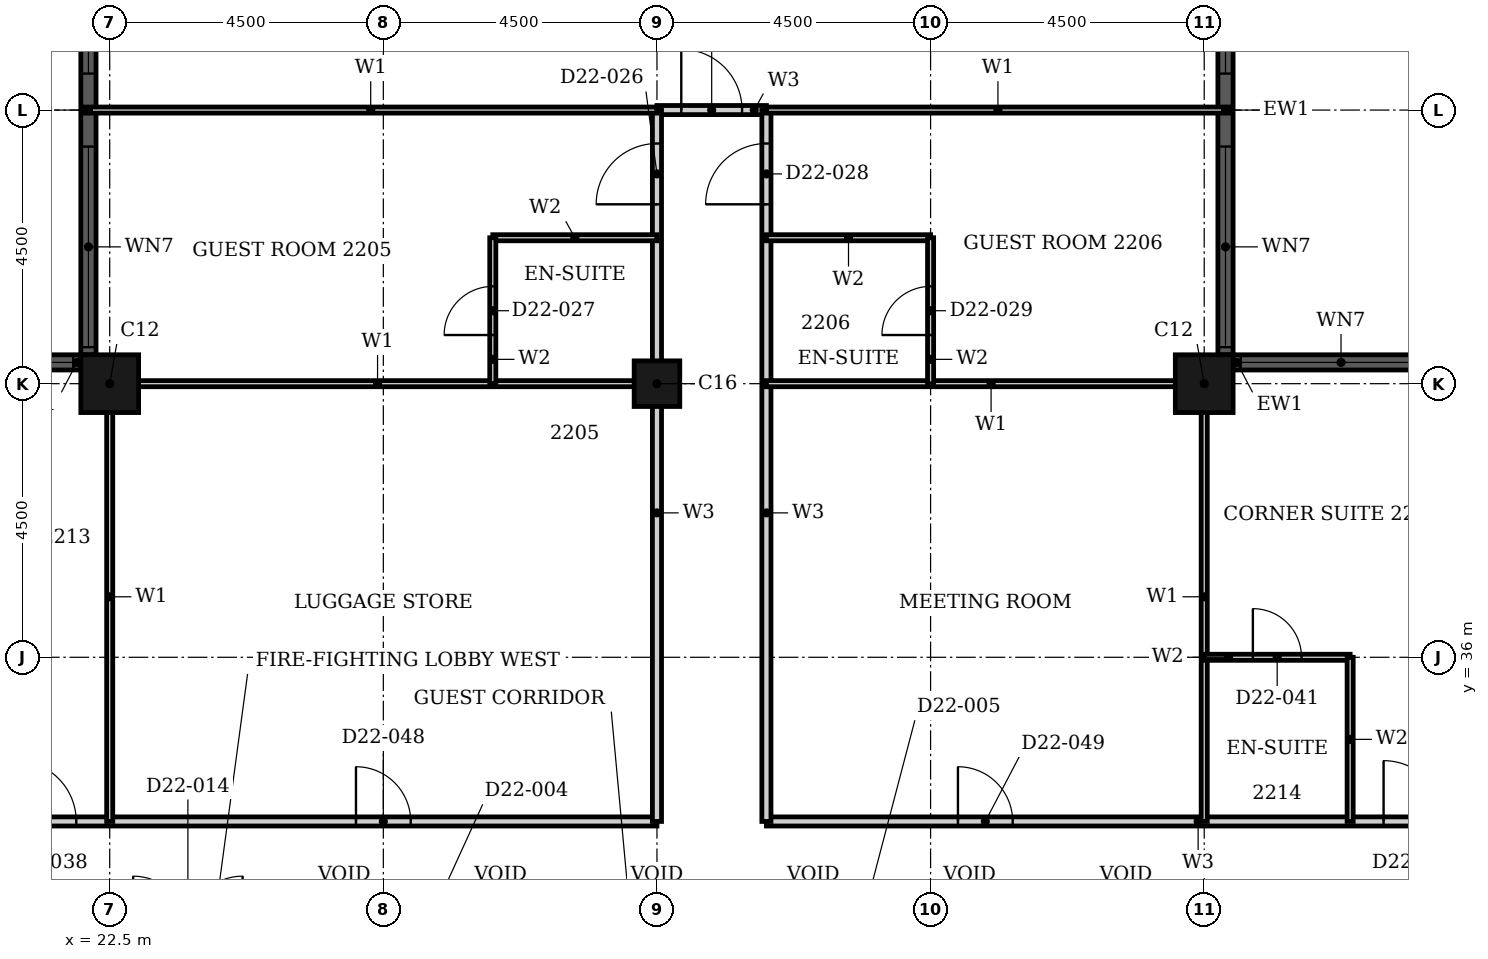
"""IFC4 building model, lengths in metres.
Left out: names, types, materials, properties, quantities, classifications, styles, units other than length and angle.
Written with IfcOpenShell. Run it as: python <this file> out.ifc"""

import sys

from ifc_helpers import new_model, si_unit, direction, frame, frame_2d, origin, origin_2d, place, context, subcontext, project, spatial, rectangle, hollow_rectangle, extrude, element, fill, save


model = new_model("IFC4")
c1 = context("Model", 3, precision=1e-05, world=origin(), true_north=direction((0.0, 1.0)))
c2 = subcontext(c1, "Body", "Model", "MODEL_VIEW")
j1 = project(units=[si_unit("LENGTHUNIT", "METRE"), si_unit("PLANEANGLEUNIT", "RADIAN")], contexts=[c1])
p1 = place(None, origin())
s1 = spatial("IfcSite", under=j1, at=p1, CompositionType="ELEMENT")
p2 = place(p1, origin())
s2 = spatial("IfcBuilding", under=s1, at=p2, CompositionType="ELEMENT")
p3 = place(p2, frame((0.0, 0.0, 92.4)))
s3 = spatial("IfcBuildingStorey", under=s2, at=p3, CompositionType="ELEMENT", Elevation=92.4)
for number, where, z_axis, x_axis in (
    (1, (40.5, 40.5, 0.0), (0.0, 0.0, 1.0), (1.0, 0.0, 0.0)),
    (2, (22.5, 40.5, 0.0), (0.0, 0.0, 1.0), (1.0, 0.0, 0.0)),
):
    element("IfcColumn", number, at=place(p3, frame(where, z_axis=z_axis, x_axis=x_axis)), inside=s3, PredefinedType="COLUMN", context=c2, shape_type="SweptSolid", body=[
        extrude(hollow_rectangle(XDim=0.95, YDim=0.95, WallThickness=0.03, at=origin_2d()), origin(), (0.0, 0.0, 1.0), 3.6),
    ])
p4 = place(p3, frame((31.5, 40.5, 0.0), z_axis=(0.0, 0.0, 1.0), x_axis=(1.0, 0.0, 0.0)))
e3 = element("IfcColumn", 3, at=p4, inside=s3, PredefinedType="COLUMN", context=c2, shape_type="SweptSolid", body=[
    extrude(hollow_rectangle(XDim=0.75, YDim=0.75, WallThickness=0.024, at=origin_2d()), origin(), (0.0, 0.0, 1.0), 3.6),
])
p5 = place(p3, frame((44.525, 40.85, 0.0), z_axis=(0.0, 0.0, 1.0), x_axis=(-1.0, 0.0, 0.0)))
e4 = element("IfcWall", 4, at=p5, inside=s3, PredefinedType="SOLIDWALL", context=c2, shape_type="SweptSolid", body=[
    extrude(rectangle(XDim=3.55, YDim=0.25, at=frame_2d((1.775, 0.0))), origin(), (0.0, 0.0, 1.0), 3.6),
])
p6 = place(p5, frame((0.125, 0.0, 0.9)))
e5 = element("IfcOpeningElement", 5, at=p6, cuts=e4, PredefinedType="OPENING", context=c2, shape_type="SweptSolid", body=[
    extrude(rectangle(XDim=3.3, YDim=1.85, at=frame_2d((1.65, 0.925))), frame((0.0, 0.135, 0.0), z_axis=(0.0, -1.0, 0.0), x_axis=(1.0, 0.0, 0.0)), (0.0, 0.0, 1.0), 0.27),
])
p7 = place(p3, frame((40.85, 40.975, 0.0), z_axis=(0.0, 0.0, 1.0), x_axis=(0.0, 1.0, 0.0)))
e6 = element("IfcWall", 6, at=p7, inside=s3, PredefinedType="SOLIDWALL", context=c2, shape_type="SweptSolid", body=[
    extrude(rectangle(XDim=8.05, YDim=0.25, at=frame_2d((4.025, 0.0))), origin(), (0.0, 0.0, 1.0), 3.6),
])
p8 = place(p7, frame((0.125, 0.0, 0.9)))
e7 = element("IfcOpeningElement", 7, at=p8, cuts=e6, PredefinedType="OPENING", context=c2, shape_type="SweptSolid", body=[
    extrude(rectangle(XDim=3.3, YDim=1.85, at=frame_2d((1.65, 0.925))), frame((0.0, 0.135, 0.0), z_axis=(0.0, -1.0, 0.0), x_axis=(1.0, 0.0, 0.0)), (0.0, 0.0, 1.0), 0.27),
])
p9 = place(p7, frame((4.625, 0.0, 0.9)))
e8 = element("IfcOpeningElement", 8, at=p9, cuts=e6, PredefinedType="OPENING", context=c2, shape_type="SweptSolid", body=[
    extrude(rectangle(XDim=3.3, YDim=1.85, at=frame_2d((1.65, 0.925))), frame((0.0, 0.135, 0.0), z_axis=(0.0, -1.0, 0.0), x_axis=(1.0, 0.0, 0.0)), (0.0, 0.0, 1.0), 0.27),
])
p10 = place(p3, frame((22.15, 49.025, 0.0), z_axis=(0.0, 0.0, 1.0), x_axis=(0.0, -1.0, 0.0)))
e9 = element("IfcWall", 9, at=p10, inside=s3, PredefinedType="SOLIDWALL", context=c2, shape_type="SweptSolid", body=[
    extrude(rectangle(XDim=8.05, YDim=0.25, at=frame_2d((4.025, 0.0))), origin(), (0.0, 0.0, 1.0), 3.6),
])
p11 = place(p10, frame((0.125, 0.0, 0.9)))
e10 = element("IfcOpeningElement", 10, at=p11, cuts=e9, PredefinedType="OPENING", context=c2, shape_type="SweptSolid", body=[
    extrude(rectangle(XDim=3.3, YDim=1.85, at=frame_2d((1.65, 0.925))), frame((0.0, 0.135, 0.0), z_axis=(0.0, -1.0, 0.0), x_axis=(1.0, 0.0, 0.0)), (0.0, 0.0, 1.0), 0.27),
])
p12 = place(p10, frame((4.625, 0.0, 0.9)))
e11 = element("IfcOpeningElement", 11, at=p12, cuts=e9, PredefinedType="OPENING", context=c2, shape_type="SweptSolid", body=[
    extrude(rectangle(XDim=3.3, YDim=1.85, at=frame_2d((1.65, 0.925))), frame((0.0, 0.135, 0.0), z_axis=(0.0, -1.0, 0.0), x_axis=(1.0, 0.0, 0.0)), (0.0, 0.0, 1.0), 0.27),
])
p13 = place(p3, frame((22.025, 40.85, 0.0), z_axis=(0.0, 0.0, 1.0), x_axis=(-1.0, 0.0, 0.0)))
e12 = element("IfcWall", 12, at=p13, inside=s3, PredefinedType="SOLIDWALL", context=c2, shape_type="SweptSolid", body=[
    extrude(rectangle(XDim=3.55, YDim=0.25, at=frame_2d((1.775, 0.0))), origin(), (0.0, 0.0, 1.0), 3.6),
])
p14 = place(p13, frame((0.125, 0.0, 0.9)))
e13 = element("IfcOpeningElement", 13, at=p14, cuts=e12, PredefinedType="OPENING", context=c2, shape_type="SweptSolid", body=[
    extrude(rectangle(XDim=3.3, YDim=1.85, at=frame_2d((1.65, 0.925))), frame((0.0, 0.135, 0.0), z_axis=(0.0, -1.0, 0.0), x_axis=(1.0, 0.0, 0.0)), (0.0, 0.0, 1.0), 0.27),
])
p15 = place(p3, frame((16.2, 33.3, 0.0), z_axis=(0.0, 0.0, 1.0), x_axis=(1.0, 0.0, 0.0)))
e14 = element("IfcWall", 14, at=p15, inside=s3, PredefinedType="PARTITIONING", context=c2, shape_type="SweptSolid", body=[
    extrude(rectangle(XDim=15.3, YDim=0.15, at=frame_2d((7.65, 0.0))), origin(), (0.0, 0.0, 1.0), 3.2),
])
p16 = place(p15, frame((4.75, 0.0, 0.0)))
e15 = element("IfcOpeningElement", 15, at=p16, cuts=e14, PredefinedType="OPENING", context=c2, shape_type="SweptSolid", body=[
    extrude(rectangle(XDim=1.0, YDim=2.1, at=frame_2d((0.5, 1.05))), frame((0.0, 0.085, 0.0), z_axis=(0.0, -1.0, 0.0), x_axis=(1.0, 0.0, 0.0)), (0.0, 0.0, 1.0), 0.17),
])
p17 = place(p15, frame((10.35, 0.0, 0.0)))
e16 = element("IfcOpeningElement", 16, at=p17, cuts=e14, PredefinedType="OPENING", context=c2, shape_type="SweptSolid", body=[
    extrude(rectangle(XDim=0.9, YDim=2.1, at=frame_2d((0.45, 1.05))), frame((0.0, 0.085, 0.0), z_axis=(0.0, -1.0, 0.0), x_axis=(1.0, 0.0, 0.0)), (0.0, 0.0, 1.0), 0.17),
])
p18 = place(p3, frame((33.3, 33.3, 0.0), z_axis=(0.0, 0.0, 1.0), x_axis=(1.0, 0.0, 0.0)))
e17 = element("IfcWall", 17, at=p18, inside=s3, PredefinedType="PARTITIONING", context=c2, shape_type="SweptSolid", body=[
    extrude(rectangle(XDim=13.5, YDim=0.15, at=frame_2d((6.75, 0.0))), origin(), (0.0, 0.0, 1.0), 3.2),
])
p19 = place(p18, frame((10.15, 0.0, 0.0)))
e18 = element("IfcOpeningElement", 18, at=p19, cuts=e17, PredefinedType="OPENING", context=c2, shape_type="SweptSolid", body=[
    extrude(rectangle(XDim=1.0, YDim=2.1, at=frame_2d((0.5, 1.05))), frame((0.0, 0.085, 0.0), z_axis=(0.0, -1.0, 0.0), x_axis=(1.0, 0.0, 0.0)), (0.0, 0.0, 1.0), 0.17),
])
p20 = place(p18, frame((3.15, 0.0, 0.0)))
e19 = element("IfcOpeningElement", 19, at=p20, cuts=e17, PredefinedType="OPENING", context=c2, shape_type="SweptSolid", body=[
    extrude(rectangle(XDim=0.9, YDim=2.1, at=frame_2d((0.45, 1.05))), frame((0.0, 0.085, 0.0), z_axis=(0.0, -1.0, 0.0), x_axis=(1.0, 0.0, 0.0)), (0.0, 0.0, 1.0), 0.17),
])
p21 = place(p3, frame((31.5, 45.0, 0.0), z_axis=(0.0, 0.0, 1.0), x_axis=(1.0, 0.0, 0.0)))
e20 = element("IfcWall", 20, at=p21, inside=s3, PredefinedType="PARTITIONING", context=c2, shape_type="SweptSolid", body=[
    extrude(rectangle(XDim=1.8, YDim=0.15, at=frame_2d((0.9, 0.0))), origin(), (0.0, 0.0, 1.0), 3.2),
])
p22 = place(p21, frame((0.4, 0.0, 0.0)))
e21 = element("IfcOpeningElement", 21, at=p22, cuts=e20, PredefinedType="OPENING", context=c2, shape_type="SweptSolid", body=[
    extrude(rectangle(XDim=1.0, YDim=2.1, at=frame_2d((0.5, 1.05))), frame((0.0, 0.085, 0.0), z_axis=(0.0, -1.0, 0.0), x_axis=(1.0, 0.0, 0.0)), (0.0, 0.0, 1.0), 0.17),
])
p23 = place(p3, frame((31.5, 33.3, 0.0), z_axis=(0.0, 0.0, 1.0), x_axis=(0.0, 1.0, 0.0)))
e22 = element("IfcWall", 22, at=p23, inside=s3, PredefinedType="PARTITIONING", context=c2, shape_type="SweptSolid", body=[
    extrude(rectangle(XDim=11.7, YDim=0.15, at=frame_2d((5.85, 0.0))), origin(), (0.0, 0.0, 1.0), 2.48),
])
p24 = place(p23, frame((10.15, 0.0, 0.0)))
e23 = element("IfcOpeningElement", 23, at=p24, cuts=e22, PredefinedType="OPENING", context=c2, shape_type="SweptSolid", body=[
    extrude(rectangle(XDim=1.0, YDim=2.1, at=frame_2d((0.5, 1.05))), frame((0.0, 0.085, 0.0), z_axis=(0.0, -1.0, 0.0), x_axis=(1.0, 0.0, 0.0)), (0.0, 0.0, 1.0), 0.17),
])
p25 = place(p3, frame((33.3, 33.3, 0.0), z_axis=(0.0, 0.0, 1.0), x_axis=(0.0, 1.0, 0.0)))
e24 = element("IfcWall", 24, at=p25, inside=s3, PredefinedType="PARTITIONING", context=c2, shape_type="SweptSolid", body=[
    extrude(rectangle(XDim=11.7, YDim=0.15, at=frame_2d((5.85, 0.0))), origin(), (0.0, 0.0, 1.0), 3.2),
])
p26 = place(p25, frame((10.15, 0.0, 0.0)))
e25 = element("IfcOpeningElement", 25, at=p26, cuts=e24, PredefinedType="OPENING", context=c2, shape_type="SweptSolid", body=[
    extrude(rectangle(XDim=1.0, YDim=2.1, at=frame_2d((0.5, 1.05))), frame((0.0, 0.085, 0.0), z_axis=(0.0, -1.0, 0.0), x_axis=(1.0, 0.0, 0.0)), (0.0, 0.0, 1.0), 0.17),
])
p27 = place(p3, frame((33.3, 40.5, 0.0), z_axis=(0.0, 0.0, 1.0), x_axis=(1.0, 0.0, 0.0)))
e26 = element("IfcWall", 26, at=p27, inside=s3, PredefinedType="PARTITIONING", context=c2, shape_type="SweptSolid", body=[
    extrude(rectangle(XDim=7.39, YDim=0.1, at=frame_2d((3.695, 0.0))), origin(), (0.0, 0.0, 1.0), 2.28),
])
p28 = place(p3, frame((22.31, 40.5, 0.0), z_axis=(0.0, 0.0, 1.0), x_axis=(1.0, 0.0, 0.0)))
e27 = element("IfcWall", 27, at=p28, inside=s3, PredefinedType="PARTITIONING", context=c2, shape_type="SweptSolid", body=[
    extrude(rectangle(XDim=9.19, YDim=0.1, at=frame_2d((4.595, 0.0))), origin(), (0.0, 0.0, 1.0), 2.28),
])
p29 = place(p3, frame((33.3, 45.0, 0.0), z_axis=(0.0, 0.0, 1.0), x_axis=(1.0, 0.0, 0.0)))
e28 = element("IfcWall", 28, at=p29, inside=s3, PredefinedType="PARTITIONING", context=c2, shape_type="SweptSolid", body=[
    extrude(rectangle(XDim=7.615, YDim=0.1, at=frame_2d((3.808, 0.0))), origin(), (0.0, 0.0, 1.0), 3.2),
])
p30 = place(p3, frame((22.085, 45.0, 0.0), z_axis=(0.0, 0.0, 1.0), x_axis=(1.0, 0.0, 0.0)))
e29 = element("IfcWall", 29, at=p30, inside=s3, PredefinedType="PARTITIONING", context=c2, shape_type="SweptSolid", body=[
    extrude(rectangle(XDim=9.415, YDim=0.1, at=frame_2d((4.708, 0.0))), origin(), (0.0, 0.0, 1.0), 3.2),
])
for number, where, z_axis, x_axis in (
    (30, (22.5, 33.3, 0.0), (0.0, 0.0, 1.0), (0.0, 1.0, 0.0)),
    (31, (40.5, 33.3, 0.0), (0.0, 0.0, 1.0), (0.0, 1.0, 0.0)),
):
    element("IfcWall", number, at=place(p3, frame(where, z_axis=z_axis, x_axis=x_axis)), inside=s3, PredefinedType="PARTITIONING", context=c2, shape_type="SweptSolid", body=[
        extrude(rectangle(XDim=7.39, YDim=0.1, at=frame_2d((3.695, 0.0))), origin(), (0.0, 0.0, 1.0), 3.2),
    ])
p31 = place(p3, frame((40.5, 36.0, 0.0), z_axis=(0.0, 0.0, 1.0), x_axis=(1.0, 0.0, 0.0)))
e32 = element("IfcWall", 32, at=p31, inside=s3, PredefinedType="PARTITIONING", context=c2, shape_type="SweptSolid", body=[
    extrude(rectangle(XDim=2.4, YDim=0.1, at=frame_2d((1.2, 0.0))), origin(), (0.0, 0.0, 1.0), 3.2),
])
p32 = place(p31, frame((0.8, 0.0, 0.0)))
e33 = element("IfcOpeningElement", 33, at=p32, cuts=e32, PredefinedType="OPENING", context=c2, shape_type="SweptSolid", body=[
    extrude(rectangle(XDim=0.8, YDim=2.1, at=frame_2d((0.4, 1.05))), frame((0.0, 0.06, 0.0), z_axis=(0.0, -1.0, 0.0), x_axis=(1.0, 0.0, 0.0)), (0.0, 0.0, 1.0), 0.12),
])
for number, where, z_axis, x_axis in (
    (34, (33.3, 42.9, 0.0), (0.0, 0.0, 1.0), (1.0, 0.0, 0.0)),
    (35, (28.8, 42.9, 0.0), (0.0, 0.0, 1.0), (1.0, 0.0, 0.0)),
):
    element("IfcWall", number, at=place(p3, frame(where, z_axis=z_axis, x_axis=x_axis)), inside=s3, PredefinedType="PARTITIONING", context=c2, shape_type="SweptSolid", body=[
        extrude(rectangle(XDim=2.7, YDim=0.1, at=frame_2d((1.35, 0.0))), origin(), (0.0, 0.0, 1.0), 3.2),
    ])
p33 = place(p3, frame((28.8, 40.5, 0.0), z_axis=(0.0, 0.0, 1.0), x_axis=(0.0, 1.0, 0.0)))
e36 = element("IfcWall", 36, at=p33, inside=s3, PredefinedType="PARTITIONING", context=c2, shape_type="SweptSolid", body=[
    extrude(rectangle(XDim=2.4, YDim=0.1, at=frame_2d((1.2, 0.0))), origin(), (0.0, 0.0, 1.0), 3.2),
])
p34 = place(p33, frame((0.8, 0.0, 0.0)))
e37 = element("IfcOpeningElement", 37, at=p34, cuts=e36, PredefinedType="OPENING", context=c2, shape_type="SweptSolid", body=[
    extrude(rectangle(XDim=0.8, YDim=2.1, at=frame_2d((0.4, 1.05))), frame((0.0, 0.06, 0.0), z_axis=(0.0, -1.0, 0.0), x_axis=(1.0, 0.0, 0.0)), (0.0, 0.0, 1.0), 0.12),
])
p35 = place(p3, frame((36.0, 40.5, 0.0), z_axis=(0.0, 0.0, 1.0), x_axis=(0.0, 1.0, 0.0)))
e38 = element("IfcWall", 38, at=p35, inside=s3, PredefinedType="PARTITIONING", context=c2, shape_type="SweptSolid", body=[
    extrude(rectangle(XDim=2.4, YDim=0.1, at=frame_2d((1.2, 0.0))), origin(), (0.0, 0.0, 1.0), 2.48),
])
p36 = place(p35, frame((0.8, 0.0, 0.0)))
e39 = element("IfcOpeningElement", 39, at=p36, cuts=e38, PredefinedType="OPENING", context=c2, shape_type="SweptSolid", body=[
    extrude(rectangle(XDim=0.8, YDim=2.1, at=frame_2d((0.4, 1.05))), frame((0.0, 0.06, 0.0), z_axis=(0.0, -1.0, 0.0), x_axis=(1.0, 0.0, 0.0)), (0.0, 0.0, 1.0), 0.12),
])
p37 = place(p3, frame((42.9, 33.3, 0.0), z_axis=(0.0, 0.0, 1.0), x_axis=(0.0, 1.0, 0.0)))
e40 = element("IfcWall", 40, at=p37, inside=s3, PredefinedType="PARTITIONING", context=c2, shape_type="SweptSolid", body=[
    extrude(rectangle(XDim=2.7, YDim=0.1, at=frame_2d((1.35, 0.0))), origin(), (0.0, 0.0, 1.0), 3.2),
])
p38 = place(p6, origin())
e41 = element("IfcWindow", 41, at=p38, inside=s3, PartitioningType="SINGLE_PANEL", PredefinedType="WINDOW", context=c2, shape_type="SweptSolid", body=[
    extrude(rectangle(XDim=3.3, YDim=1.85, at=frame_2d((1.65, 0.925))), frame((0.0, 0.03, 0.0), z_axis=(0.0, -1.0, 0.0), x_axis=(1.0, 0.0, 0.0)), (0.0, 0.0, 1.0), 0.06),
])
fill(e5, e41)
p39 = place(p8, origin())
e42 = element("IfcWindow", 42, at=p39, inside=s3, PartitioningType="SINGLE_PANEL", PredefinedType="WINDOW", context=c2, shape_type="SweptSolid", body=[
    extrude(rectangle(XDim=3.3, YDim=1.85, at=frame_2d((1.65, 0.925))), frame((0.0, 0.03, 0.0), z_axis=(0.0, -1.0, 0.0), x_axis=(1.0, 0.0, 0.0)), (0.0, 0.0, 1.0), 0.06),
])
fill(e7, e42)
p40 = place(p9, origin())
e43 = element("IfcWindow", 43, at=p40, inside=s3, PartitioningType="SINGLE_PANEL", PredefinedType="WINDOW", context=c2, shape_type="SweptSolid", body=[
    extrude(rectangle(XDim=3.3, YDim=1.85, at=frame_2d((1.65, 0.925))), frame((0.0, 0.03, 0.0), z_axis=(0.0, -1.0, 0.0), x_axis=(1.0, 0.0, 0.0)), (0.0, 0.0, 1.0), 0.06),
])
fill(e8, e43)
p41 = place(p11, origin())
e44 = element("IfcWindow", 44, at=p41, inside=s3, PartitioningType="SINGLE_PANEL", PredefinedType="WINDOW", context=c2, shape_type="SweptSolid", body=[
    extrude(rectangle(XDim=3.3, YDim=1.85, at=frame_2d((1.65, 0.925))), frame((0.0, 0.03, 0.0), z_axis=(0.0, -1.0, 0.0), x_axis=(1.0, 0.0, 0.0)), (0.0, 0.0, 1.0), 0.06),
])
fill(e10, e44)
p42 = place(p12, origin())
e45 = element("IfcWindow", 45, at=p42, inside=s3, PartitioningType="SINGLE_PANEL", PredefinedType="WINDOW", context=c2, shape_type="SweptSolid", body=[
    extrude(rectangle(XDim=3.3, YDim=1.85, at=frame_2d((1.65, 0.925))), frame((0.0, 0.03, 0.0), z_axis=(0.0, -1.0, 0.0), x_axis=(1.0, 0.0, 0.0)), (0.0, 0.0, 1.0), 0.06),
])
fill(e11, e45)
p43 = place(p14, origin())
e46 = element("IfcWindow", 46, at=p43, inside=s3, PartitioningType="SINGLE_PANEL", PredefinedType="WINDOW", context=c2, shape_type="SweptSolid", body=[
    extrude(rectangle(XDim=3.3, YDim=1.85, at=frame_2d((1.65, 0.925))), frame((0.0, 0.03, 0.0), z_axis=(0.0, -1.0, 0.0), x_axis=(1.0, 0.0, 0.0)), (0.0, 0.0, 1.0), 0.06),
])
fill(e13, e46)
p44 = place(p24, origin())
e47 = element("IfcDoor", 47, at=p44, inside=s3, OperationType="SINGLE_SWING_RIGHT", PredefinedType="DOOR", context=c2, shape_type="SweptSolid", body=[
    extrude(rectangle(XDim=1.0, YDim=2.1, at=frame_2d((0.5, 1.05))), frame((0.0, 0.025, 0.0), z_axis=(0.0, -1.0, 0.0), x_axis=(1.0, 0.0, 0.0)), (0.0, 0.0, 1.0), 0.05),
])
fill(e23, e47)
p45 = place(p34, origin())
e48 = element("IfcDoor", 48, at=p45, inside=s3, OperationType="SINGLE_SWING_LEFT", PredefinedType="DOOR", context=c2, shape_type="SweptSolid", body=[
    extrude(rectangle(XDim=0.8, YDim=2.1, at=frame_2d((0.4, 1.05))), frame((0.0, 0.025, 0.0), z_axis=(0.0, -1.0, 0.0), x_axis=(1.0, 0.0, 0.0)), (0.0, 0.0, 1.0), 0.05),
])
fill(e37, e48)
p46 = place(p26, origin())
e49 = element("IfcDoor", 49, at=p46, inside=s3, OperationType="SINGLE_SWING_RIGHT", PredefinedType="DOOR", context=c2, shape_type="SweptSolid", body=[
    extrude(rectangle(XDim=1.0, YDim=2.1, at=frame_2d((0.5, 1.05))), frame((0.0, 0.025, 0.0), z_axis=(0.0, -1.0, 0.0), x_axis=(1.0, 0.0, 0.0)), (0.0, 0.0, 1.0), 0.05),
])
fill(e25, e49)
p47 = place(p36, origin())
e50 = element("IfcDoor", 50, at=p47, inside=s3, OperationType="SINGLE_SWING_LEFT", PredefinedType="DOOR", context=c2, shape_type="SweptSolid", body=[
    extrude(rectangle(XDim=0.8, YDim=2.1, at=frame_2d((0.4, 1.05))), frame((0.0, 0.025, 0.0), z_axis=(0.0, -1.0, 0.0), x_axis=(1.0, 0.0, 0.0)), (0.0, 0.0, 1.0), 0.05),
])
fill(e39, e50)
p48 = place(p22, origin())
e51 = element("IfcDoor", 51, at=p48, inside=s3, OperationType="SINGLE_SWING_RIGHT", PredefinedType="DOOR", context=c2, shape_type="SweptSolid", body=[
    extrude(rectangle(XDim=1.0, YDim=2.1, at=frame_2d((0.5, 1.05))), frame((0.0, 0.025, 0.0), z_axis=(0.0, -1.0, 0.0), x_axis=(1.0, 0.0, 0.0)), (0.0, 0.0, 1.0), 0.05),
])
fill(e21, e51)
p49 = place(p16, origin())
e52 = element("IfcDoor", 52, at=p49, inside=s3, OperationType="SINGLE_SWING_RIGHT", PredefinedType="DOOR", context=c2, shape_type="SweptSolid", body=[
    extrude(rectangle(XDim=1.0, YDim=2.1, at=frame_2d((0.5, 1.05))), frame((0.0, 0.025, 0.0), z_axis=(0.0, -1.0, 0.0), x_axis=(1.0, 0.0, 0.0)), (0.0, 0.0, 1.0), 0.05),
])
fill(e15, e52)
p50 = place(p19, origin())
e53 = element("IfcDoor", 53, at=p50, inside=s3, OperationType="SINGLE_SWING_RIGHT", PredefinedType="DOOR", context=c2, shape_type="SweptSolid", body=[
    extrude(rectangle(XDim=1.0, YDim=2.1, at=frame_2d((0.5, 1.05))), frame((0.0, 0.025, 0.0), z_axis=(0.0, -1.0, 0.0), x_axis=(1.0, 0.0, 0.0)), (0.0, 0.0, 1.0), 0.05),
])
fill(e18, e53)
p51 = place(p32, origin())
e54 = element("IfcDoor", 54, at=p51, inside=s3, OperationType="SINGLE_SWING_LEFT", PredefinedType="DOOR", context=c2, shape_type="SweptSolid", body=[
    extrude(rectangle(XDim=0.8, YDim=2.1, at=frame_2d((0.4, 1.05))), frame((0.0, 0.025, 0.0), z_axis=(0.0, -1.0, 0.0), x_axis=(1.0, 0.0, 0.0)), (0.0, 0.0, 1.0), 0.05),
])
fill(e33, e54)
p52 = place(p17, origin())
e55 = element("IfcDoor", 55, at=p52, inside=s3, OperationType="SINGLE_SWING_LEFT", PredefinedType="DOOR", context=c2, shape_type="SweptSolid", body=[
    extrude(rectangle(XDim=0.9, YDim=2.1, at=frame_2d((0.45, 1.05))), frame((0.0, 0.025, 0.0), z_axis=(0.0, -1.0, 0.0), x_axis=(1.0, 0.0, 0.0)), (0.0, 0.0, 1.0), 0.05),
])
fill(e16, e55)
p53 = place(p20, origin())
e56 = element("IfcDoor", 56, at=p53, inside=s3, OperationType="SINGLE_SWING_RIGHT", PredefinedType="DOOR", context=c2, shape_type="SweptSolid", body=[
    extrude(rectangle(XDim=0.9, YDim=2.1, at=frame_2d((0.45, 1.05))), frame((0.0, 0.025, 0.0), z_axis=(0.0, -1.0, 0.0), x_axis=(1.0, 0.0, 0.0)), (0.0, 0.0, 1.0), 0.05),
])
fill(e19, e56)
save(model, sys.argv[1])
